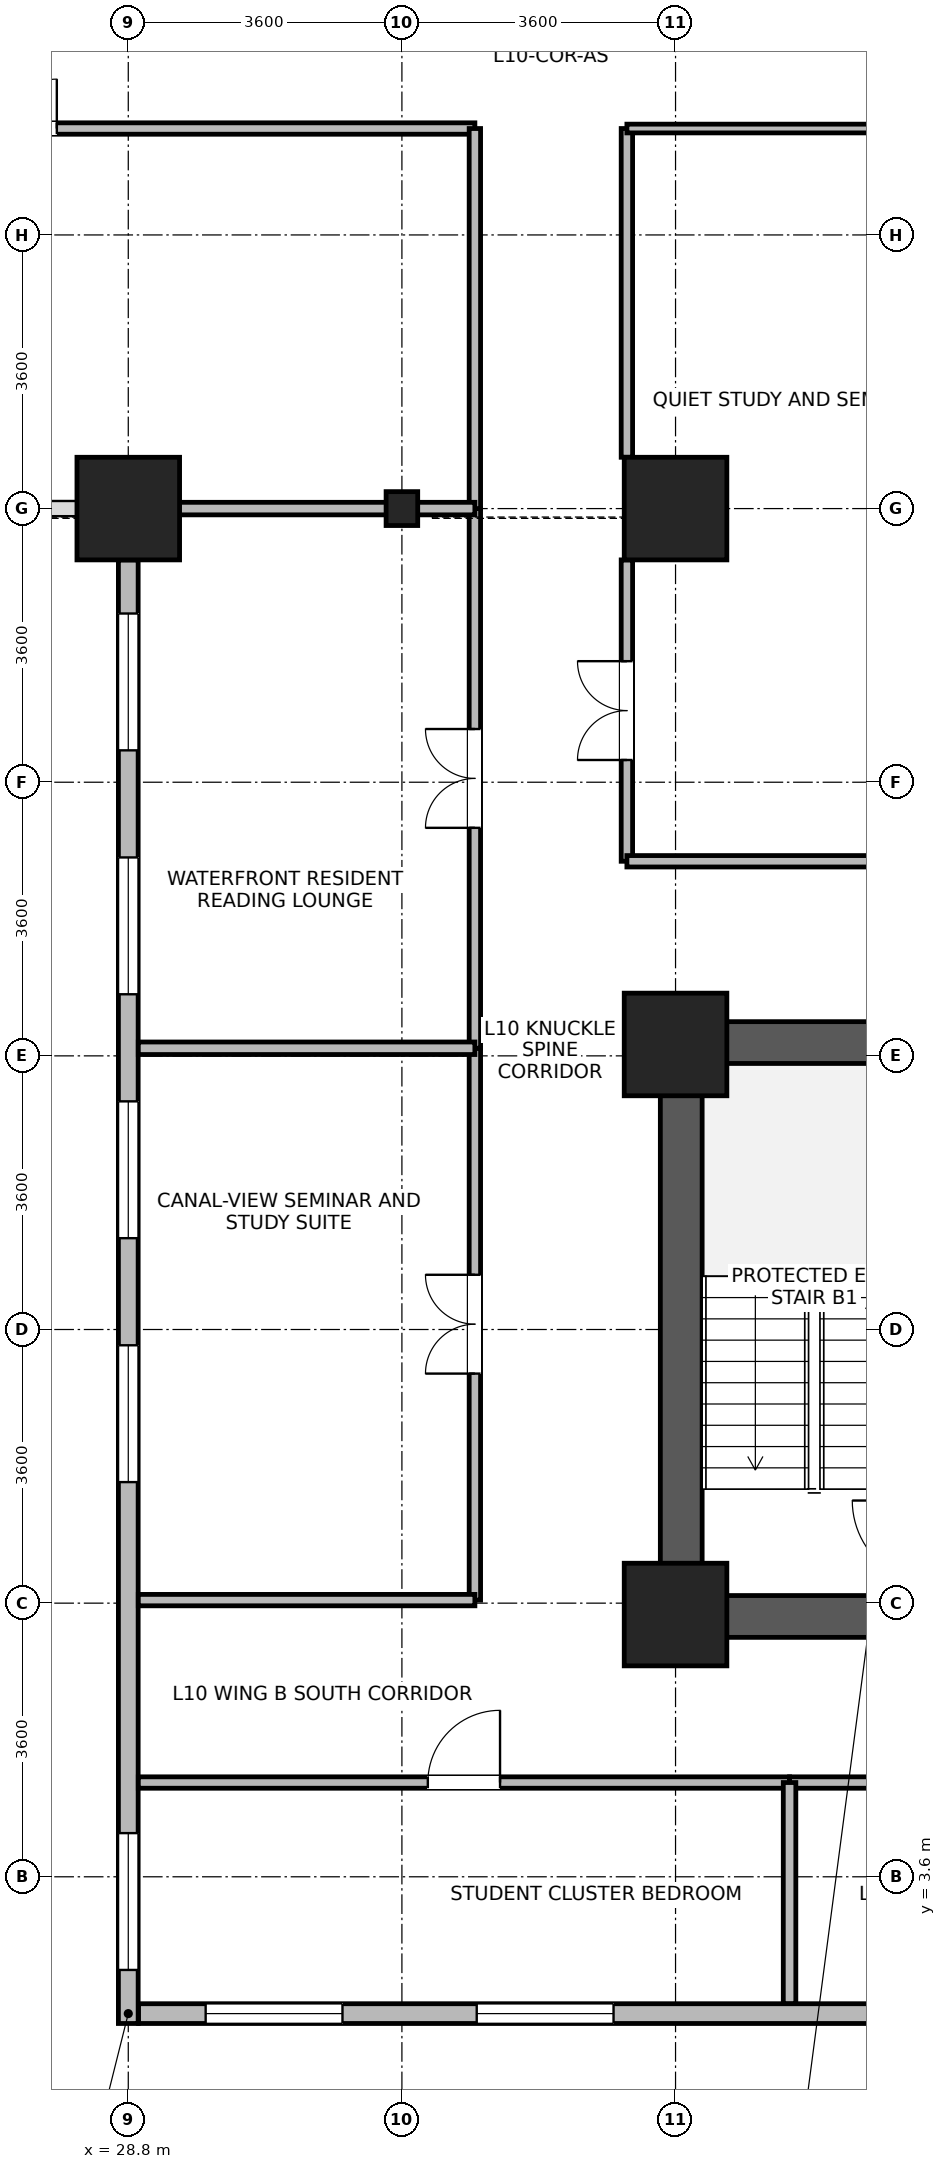
"""IFC4 building model, lengths in metres.
Left out: names, types, materials, properties, quantities, classifications, styles, units other than length and angle.
Written with IfcOpenShell. Run it as: python <this file> out.ifc"""

import sys

from ifc_helpers import new_model, si_unit, direction, frame, frame_2d, origin, origin_2d, place, context, subcontext, project, spatial, rectangle, i_section, extrude, source, transform, mapped, element, fill, save


model = new_model("IFC4")
c1 = context("Model", 3, precision=1e-05, world=origin(), true_north=direction((0.0, 1.0)))
c2 = subcontext(c1, "Body", "Model", "MODEL_VIEW")
j1 = project(units=[si_unit("LENGTHUNIT", "METRE"), si_unit("PLANEANGLEUNIT", "RADIAN")], contexts=[c1])
p1 = place(None, origin())
s1 = spatial("IfcSite", under=j1, at=p1, CompositionType="ELEMENT")
p2 = place(p1, origin())
s2 = spatial("IfcBuilding", under=s1, at=p2, CompositionType="ELEMENT")
p3 = place(p2, frame((0.0, 0.0, 43.8)))
s3 = spatial("IfcBuildingStorey", under=s2, at=p3, CompositionType="ELEMENT", Elevation=43.8)
p4 = place(p3, frame((36.075, 6.75, 0.0), z_axis=(0.0, 0.0, 1.0), x_axis=(0.0, 1.0, 0.0)))
e1 = element("IfcWall", 1, at=p4, inside=s3, PredefinedType="SHEAR", context=c2, shape_type="SweptSolid", body=[
    extrude(rectangle(XDim=8.1, YDim=0.55, at=frame_2d((4.05, 0.0))), origin(), (0.0, 0.0, 1.0), 3.45),
])
for number, where, z_axis, x_axis in (
    (2, (36.35, 7.025, 0.0), (0.0, 0.0, 1.0), (1.0, 0.0, 0.0)),
    (3, (36.35, 14.575, 0.0), (0.0, 0.0, 1.0), (1.0, 0.0, 0.0)),
):
    element("IfcWall", number, at=place(p3, frame(where, z_axis=z_axis, x_axis=x_axis)), inside=s3, PredefinedType="SHEAR", context=c2, shape_type="SweptSolid", body=[
        extrude(rectangle(XDim=3.2, YDim=0.55, at=frame_2d((1.6, 0.0))), origin(), (0.0, 0.0, 1.0), 3.45),
    ])
m1 = source(origin(), c2, "Body", "SweptSolid", [
    extrude(rectangle(XDim=1.35, YDim=1.35, at=origin_2d()), origin(), (0.0, 0.0, 1.0), 3.7),
])
for number, where, z_axis, x_axis in (
    (4, (28.8, 21.6, 0.0), (0.0, 0.0, 1.0), (1.0, 0.0, 0.0)),
    (5, (36.0, 21.6, 0.0), (0.0, 0.0, 1.0), (1.0, 0.0, 0.0)),
    (6, (36.0, 7.05, 0.0), (0.0, 0.0, 1.0), (1.0, 0.0, 0.0)),
    (7, (36.0, 14.55, 0.0), (0.0, 0.0, 1.0), (1.0, 0.0, 0.0)),
):
    element("IfcColumn", number, at=place(p3, frame(where, z_axis=z_axis, x_axis=x_axis)), inside=s3, PredefinedType="COLUMN", context=c2, shape_type="MappedRepresentation", body=[
        mapped(m1, transform((0.0, 0.0, 0.0), x_axis=(1.0, 0.0, 0.0), y_axis=(0.0, 1.0, 0.0), z_axis=(0.0, 0.0, 1.0), scale=1.0)),
    ])
m2 = source(origin(), c2, "Body", "SweptSolid", [
    extrude(i_section(OverallWidth=0.416, OverallDepth=0.446, WebThickness=0.029, FlangeThickness=0.04, FilletRadius=0.015, at=origin_2d()), origin(), (0.0, 0.0, 1.0), 3.7),
])
p5 = place(p3, frame((32.4, 21.6, 0.0), z_axis=(0.0, 0.0, 1.0), x_axis=(1.0, 0.0, 0.0)))
e8 = element("IfcColumn", 8, at=p5, inside=s3, PredefinedType="COLUMN", context=c2, shape_type="MappedRepresentation", body=[
    mapped(m2, transform((0.0, 0.0, 0.0), x_axis=(1.0, 0.0, 0.0), y_axis=(0.0, 1.0, 0.0), z_axis=(0.0, 0.0, 1.0), scale=1.0)),
])
p6 = place(p3, frame((57.465, 1.8, 0.0), z_axis=(0.0, 0.0, 1.0), x_axis=(-1.0, 0.0, 0.0)))
e9 = element("IfcWall", 9, at=p6, inside=s3, PredefinedType="STANDARD", context=c2, shape_type="SweptSolid", body=[
    extrude(rectangle(XDim=28.53, YDim=0.26, at=frame_2d((14.265, 0.0))), origin(), (0.0, 0.0, 1.0), 3.43),
])
p7 = place(p6, frame((0.883, 0.0, 0.85)))
e10 = element("IfcOpeningElement", 10, at=p7, cuts=e9, PredefinedType="OPENING", context=c2, shape_type="SweptSolid", body=[
    extrude(rectangle(XDim=1.8, YDim=1.85, at=frame_2d((0.9, 0.925))), frame((0.0, 0.14, 0.0), z_axis=(0.0, -1.0, 0.0), x_axis=(1.0, 0.0, 0.0)), (0.0, 0.0, 1.0), 0.28),
])
p8 = place(p6, frame((4.449, 0.0, 0.85)))
e11 = element("IfcOpeningElement", 11, at=p8, cuts=e9, PredefinedType="OPENING", context=c2, shape_type="SweptSolid", body=[
    extrude(rectangle(XDim=1.8, YDim=1.85, at=frame_2d((0.9, 0.925))), frame((0.0, 0.14, 0.0), z_axis=(0.0, -1.0, 0.0), x_axis=(1.0, 0.0, 0.0)), (0.0, 0.0, 1.0), 0.28),
])
p9 = place(p6, frame((8.016, 0.0, 0.85)))
e12 = element("IfcOpeningElement", 12, at=p9, cuts=e9, PredefinedType="OPENING", context=c2, shape_type="SweptSolid", body=[
    extrude(rectangle(XDim=1.8, YDim=1.85, at=frame_2d((0.9, 0.925))), frame((0.0, 0.14, 0.0), z_axis=(0.0, -1.0, 0.0), x_axis=(1.0, 0.0, 0.0)), (0.0, 0.0, 1.0), 0.28),
])
p10 = place(p6, frame((11.582, 0.0, 0.85)))
e13 = element("IfcOpeningElement", 13, at=p10, cuts=e9, PredefinedType="OPENING", context=c2, shape_type="SweptSolid", body=[
    extrude(rectangle(XDim=1.8, YDim=1.85, at=frame_2d((0.9, 0.925))), frame((0.0, 0.14, 0.0), z_axis=(0.0, -1.0, 0.0), x_axis=(1.0, 0.0, 0.0)), (0.0, 0.0, 1.0), 0.28),
])
p11 = place(p6, frame((15.148, 0.0, 0.85)))
e14 = element("IfcOpeningElement", 14, at=p11, cuts=e9, PredefinedType="OPENING", context=c2, shape_type="SweptSolid", body=[
    extrude(rectangle(XDim=1.8, YDim=1.85, at=frame_2d((0.9, 0.925))), frame((0.0, 0.14, 0.0), z_axis=(0.0, -1.0, 0.0), x_axis=(1.0, 0.0, 0.0)), (0.0, 0.0, 1.0), 0.28),
])
p12 = place(p6, frame((22.281, 0.0, 0.85)))
e15 = element("IfcOpeningElement", 15, at=p12, cuts=e9, PredefinedType="OPENING", context=c2, shape_type="SweptSolid", body=[
    extrude(rectangle(XDim=1.8, YDim=1.85, at=frame_2d((0.9, 0.925))), frame((0.0, 0.14, 0.0), z_axis=(0.0, -1.0, 0.0), x_axis=(1.0, 0.0, 0.0)), (0.0, 0.0, 1.0), 0.28),
])
p13 = place(p6, frame((25.847, 0.0, 0.85)))
e16 = element("IfcOpeningElement", 16, at=p13, cuts=e9, PredefinedType="OPENING", context=c2, shape_type="SweptSolid", body=[
    extrude(rectangle(XDim=1.8, YDim=1.85, at=frame_2d((0.9, 0.925))), frame((0.0, 0.14, 0.0), z_axis=(0.0, -1.0, 0.0), x_axis=(1.0, 0.0, 0.0)), (0.0, 0.0, 1.0), 0.28),
])
p14 = place(p3, frame((28.8, 1.67, 0.0), z_axis=(0.0, 0.0, 1.0), x_axis=(0.0, 1.0, 0.0)))
e17 = element("IfcWall", 17, at=p14, inside=s3, PredefinedType="STANDARD", context=c2, shape_type="SweptSolid", body=[
    extrude(rectangle(XDim=19.254, YDim=0.26, at=frame_2d((9.627, 0.0))), origin(), (0.0, 0.0, 1.0), 3.43),
])
p15 = place(p14, frame((0.705, 0.0, 0.85)))
e18 = element("IfcOpeningElement", 18, at=p15, cuts=e17, PredefinedType="OPENING", context=c2, shape_type="SweptSolid", body=[
    extrude(rectangle(XDim=1.8, YDim=1.85, at=frame_2d((0.9, 0.925))), frame((0.0, 0.14, 0.0), z_axis=(0.0, -1.0, 0.0), x_axis=(1.0, 0.0, 0.0)), (0.0, 0.0, 1.0), 0.28),
])
p16 = place(p14, frame((7.123, 0.0, 0.85)))
e19 = element("IfcOpeningElement", 19, at=p16, cuts=e17, PredefinedType="OPENING", context=c2, shape_type="SweptSolid", body=[
    extrude(rectangle(XDim=1.8, YDim=1.85, at=frame_2d((0.9, 0.925))), frame((0.0, 0.14, 0.0), z_axis=(0.0, -1.0, 0.0), x_axis=(1.0, 0.0, 0.0)), (0.0, 0.0, 1.0), 0.28),
])
p17 = place(p14, frame((10.332, 0.0, 0.85)))
e20 = element("IfcOpeningElement", 20, at=p17, cuts=e17, PredefinedType="OPENING", context=c2, shape_type="SweptSolid", body=[
    extrude(rectangle(XDim=1.8, YDim=1.85, at=frame_2d((0.9, 0.925))), frame((0.0, 0.14, 0.0), z_axis=(0.0, -1.0, 0.0), x_axis=(1.0, 0.0, 0.0)), (0.0, 0.0, 1.0), 0.28),
])
p18 = place(p14, frame((13.541, 0.0, 0.85)))
e21 = element("IfcOpeningElement", 21, at=p18, cuts=e17, PredefinedType="OPENING", context=c2, shape_type="SweptSolid", body=[
    extrude(rectangle(XDim=1.8, YDim=1.85, at=frame_2d((0.9, 0.925))), frame((0.0, 0.14, 0.0), z_axis=(0.0, -1.0, 0.0), x_axis=(1.0, 0.0, 0.0)), (0.0, 0.0, 1.0), 0.28),
])
p19 = place(p14, frame((16.75, 0.0, 0.85)))
e22 = element("IfcOpeningElement", 22, at=p19, cuts=e17, PredefinedType="OPENING", context=c2, shape_type="SweptSolid", body=[
    extrude(rectangle(XDim=1.8, YDim=1.85, at=frame_2d((0.9, 0.925))), frame((0.0, 0.14, 0.0), z_axis=(0.0, -1.0, 0.0), x_axis=(1.0, 0.0, 0.0)), (0.0, 0.0, 1.0), 0.28),
])
p20 = place(p3, frame((21.06, 26.6, 0.0), z_axis=(0.0, 0.0, 1.0), x_axis=(1.0, 0.0, 0.0)))
e23 = element("IfcWall", 23, at=p20, inside=s3, PredefinedType="PARTITIONING", context=c2, shape_type="SweptSolid", body=[
    extrude(rectangle(XDim=12.3, YDim=0.15, at=frame_2d((6.15, 0.0))), origin(), (0.0, 0.0, 1.0), 3.43),
])
p21 = place(p20, frame((5.5, 0.0, 0.0)))
e24 = element("IfcOpeningElement", 24, at=p21, cuts=e23, PredefinedType="OPENING", context=c2, shape_type="SweptSolid", body=[
    extrude(rectangle(XDim=1.3, YDim=2.12, at=frame_2d((0.65, 1.06))), frame((0.0, 0.085, 0.0), z_axis=(0.0, -1.0, 0.0), x_axis=(1.0, 0.0, 0.0)), (0.0, 0.0, 1.0), 0.17),
])
p22 = place(p3, frame((35.36, 16.96, 0.0), z_axis=(0.0, 0.0, 1.0), x_axis=(0.0, 1.0, 0.0)))
e25 = element("IfcWall", 25, at=p22, inside=s3, PredefinedType="PARTITIONING", context=c2, shape_type="SweptSolid", body=[
    extrude(rectangle(XDim=3.965, YDim=0.15, at=frame_2d((1.982, 0.0))), origin(), (0.0, 0.0, 1.0), 3.43),
])
p23 = place(p22, frame((1.333, 0.0, 0.0)))
e26 = element("IfcOpeningElement", 26, at=p23, cuts=e25, PredefinedType="OPENING", context=c2, shape_type="SweptSolid", body=[
    extrude(rectangle(XDim=1.3, YDim=2.12, at=frame_2d((0.65, 1.06))), frame((0.0, 0.085, 0.0), z_axis=(0.0, -1.0, 0.0), x_axis=(1.0, 0.0, 0.0)), (0.0, 0.0, 1.0), 0.17),
])
p24 = place(p3, frame((35.36, 22.275, 0.0), z_axis=(0.0, 0.0, 1.0), x_axis=(0.0, 1.0, 0.0)))
e27 = element("IfcWall", 27, at=p24, inside=s3, PredefinedType="PARTITIONING", context=c2, shape_type="SweptSolid", body=[
    extrude(rectangle(XDim=4.325, YDim=0.15, at=frame_2d((2.163, 0.0))), origin(), (0.0, 0.0, 1.0), 3.43),
])
p25 = place(p3, frame((37.5, 4.84, 0.0), z_axis=(0.0, 0.0, 1.0), x_axis=(1.0, 0.0, 0.0)))
e28 = element("IfcWall", 28, at=p25, inside=s3, PredefinedType="PARTITIONING", context=c2, shape_type="SweptSolid", body=[
    extrude(rectangle(XDim=9.2, YDim=0.15, at=frame_2d((4.6, 0.0))), origin(), (0.0, 0.0, 1.0), 3.43),
])
p26 = place(p25, frame((4.125, 0.0, 0.0)))
e29 = element("IfcOpeningElement", 29, at=p26, cuts=e28, PredefinedType="OPENING", context=c2, shape_type="SweptSolid", body=[
    extrude(rectangle(XDim=0.95, YDim=2.1, at=frame_2d((0.475, 1.05))), frame((0.0, 0.085, 0.0), z_axis=(0.0, -1.0, 0.0), x_axis=(1.0, 0.0, 0.0)), (0.0, 0.0, 1.0), 0.17),
])
p27 = place(p3, frame((28.932, 4.84, 0.0), z_axis=(0.0, 0.0, 1.0), x_axis=(1.0, 0.0, 0.0)))
e30 = element("IfcWall", 30, at=p27, inside=s3, PredefinedType="PARTITIONING", context=c2, shape_type="SweptSolid", body=[
    extrude(rectangle(XDim=8.568, YDim=0.15, at=frame_2d((4.284, 0.0))), origin(), (0.0, 0.0, 1.0), 3.43),
])
p28 = place(p27, frame((3.809, 0.0, 0.0)))
e31 = element("IfcOpeningElement", 31, at=p28, cuts=e30, PredefinedType="OPENING", context=c2, shape_type="SweptSolid", body=[
    extrude(rectangle(XDim=0.95, YDim=2.1, at=frame_2d((0.475, 1.05))), frame((0.0, 0.085, 0.0), z_axis=(0.0, -1.0, 0.0), x_axis=(1.0, 0.0, 0.0)), (0.0, 0.0, 1.0), 0.17),
])
p29 = place(p3, frame((33.36, 7.24, 0.0), z_axis=(0.0, 0.0, 1.0), x_axis=(0.0, 1.0, 0.0)))
e32 = element("IfcWall", 32, at=p29, inside=s3, PredefinedType="PARTITIONING", context=c2, shape_type="SweptSolid", body=[
    extrude(rectangle(XDim=7.26, YDim=0.15, at=frame_2d((3.63, 0.0))), origin(), (0.0, 0.0, 1.0), 3.43),
])
p30 = place(p29, frame((2.98, 0.0, 0.0)))
e33 = element("IfcOpeningElement", 33, at=p30, cuts=e32, PredefinedType="OPENING", context=c2, shape_type="SweptSolid", body=[
    extrude(rectangle(XDim=1.3, YDim=2.12, at=frame_2d((0.65, 1.06))), frame((0.0, 0.085, 0.0), z_axis=(0.0, -1.0, 0.0), x_axis=(1.0, 0.0, 0.0)), (0.0, 0.0, 1.0), 0.17),
])
p31 = place(p3, frame((33.36, 14.5, 0.0), z_axis=(0.0, 0.0, 1.0), x_axis=(0.0, 1.0, 0.0)))
e34 = element("IfcWall", 34, at=p31, inside=s3, PredefinedType="PARTITIONING", context=c2, shape_type="SweptSolid", body=[
    extrude(rectangle(XDim=7.1, YDim=0.15, at=frame_2d((3.55, 0.0))), origin(), (0.0, 0.0, 1.0), 3.43),
])
p32 = place(p31, frame((2.9, 0.0, 0.0)))
e35 = element("IfcOpeningElement", 35, at=p32, cuts=e34, PredefinedType="OPENING", context=c2, shape_type="SweptSolid", body=[
    extrude(rectangle(XDim=1.3, YDim=2.12, at=frame_2d((0.65, 1.06))), frame((0.0, 0.085, 0.0), z_axis=(0.0, -1.0, 0.0), x_axis=(1.0, 0.0, 0.0)), (0.0, 0.0, 1.0), 0.17),
])
p33 = place(p3, frame((35.36, 16.96, 0.0), z_axis=(0.0, 0.0, 1.0), x_axis=(1.0, 0.0, 0.0)))
e36 = element("IfcWall", 36, at=p33, inside=s3, PredefinedType="PARTITIONING", context=c2, shape_type="SweptSolid", body=[
    extrude(rectangle(XDim=5.14, YDim=0.15, at=frame_2d((2.57, 0.0))), origin(), (0.0, 0.0, 1.0), 3.43),
])
p34 = place(p3, frame((33.36, 21.6, 0.0), z_axis=(0.0, 0.0, 1.0), x_axis=(0.0, 1.0, 0.0)))
e37 = element("IfcWall", 37, at=p34, inside=s3, PredefinedType="PARTITIONING", context=c2, shape_type="SweptSolid", body=[
    extrude(rectangle(XDim=5.0, YDim=0.15, at=frame_2d((2.5, 0.0))), origin(), (0.0, 0.0, 1.0), 3.43),
])
p35 = place(p3, frame((28.932, 7.24, 0.0), z_axis=(0.0, 0.0, 1.0), x_axis=(1.0, 0.0, 0.0)))
e38 = element("IfcWall", 38, at=p35, inside=s3, PredefinedType="PARTITIONING", context=c2, shape_type="SweptSolid", body=[
    extrude(rectangle(XDim=4.428, YDim=0.15, at=frame_2d((2.214, 0.0))), origin(), (0.0, 0.0, 1.0), 3.43),
])
p36 = place(p3, frame((35.36, 26.6, 0.0), z_axis=(0.0, 0.0, 1.0), x_axis=(1.0, 0.0, 0.0)))
e39 = element("IfcWall", 39, at=p36, inside=s3, PredefinedType="PARTITIONING", context=c2, shape_type="SweptSolid", body=[
    extrude(rectangle(XDim=5.14, YDim=0.115, at=frame_2d((2.57, 0.0))), origin(), (0.0, 0.0, 1.0), 3.43),
])
p37 = place(p3, frame((28.932, 14.5, 0.0), z_axis=(0.0, 0.0, 1.0), x_axis=(1.0, 0.0, 0.0)))
e40 = element("IfcWall", 40, at=p37, inside=s3, PredefinedType="PARTITIONING", context=c2, shape_type="SweptSolid", body=[
    extrude(rectangle(XDim=4.428, YDim=0.165, at=frame_2d((2.214, 0.0))), origin(), (0.0, 0.0, 1.0), 3.43),
])
p38 = place(p3, frame((28.932, 21.6, 0.0), z_axis=(0.0, 0.0, 1.0), x_axis=(1.0, 0.0, 0.0)))
e41 = element("IfcWall", 41, at=p38, inside=s3, PredefinedType="PARTITIONING", context=c2, shape_type="SweptSolid", body=[
    extrude(rectangle(XDim=4.428, YDim=0.165, at=frame_2d((2.214, 0.0))), origin(), (0.0, 0.0, 1.0), 2.93),
])
p39 = place(p3, frame((37.5, 1.932, 0.0), z_axis=(0.0, 0.0, 1.0), x_axis=(0.0, 1.0, 0.0)))
e42 = element("IfcWall", 42, at=p39, inside=s3, PredefinedType="PARTITIONING", context=c2, shape_type="SweptSolid", body=[
    extrude(rectangle(XDim=2.908, YDim=0.165, at=frame_2d((1.454, 0.0))), origin(), (0.0, 0.0, 1.0), 3.43),
])
p40 = place(p12, origin())
e43 = element("IfcWindow", 43, at=p40, inside=s3, PartitioningType="SINGLE_PANEL", PredefinedType="WINDOW", context=c2, shape_type="SweptSolid", body=[
    extrude(rectangle(XDim=1.8, YDim=1.85, at=frame_2d((0.9, 0.925))), frame((0.0, 0.03, 0.0), z_axis=(0.0, -1.0, 0.0), x_axis=(1.0, 0.0, 0.0)), (0.0, 0.0, 1.0), 0.06),
])
fill(e15, e43)
p41 = place(p13, origin())
e44 = element("IfcWindow", 44, at=p41, inside=s3, PartitioningType="SINGLE_PANEL", PredefinedType="WINDOW", context=c2, shape_type="SweptSolid", body=[
    extrude(rectangle(XDim=1.8, YDim=1.85, at=frame_2d((0.9, 0.925))), frame((0.0, 0.03, 0.0), z_axis=(0.0, -1.0, 0.0), x_axis=(1.0, 0.0, 0.0)), (0.0, 0.0, 1.0), 0.06),
])
fill(e16, e44)
p42 = place(p15, origin())
e45 = element("IfcWindow", 45, at=p42, inside=s3, PartitioningType="SINGLE_PANEL", PredefinedType="WINDOW", context=c2, shape_type="SweptSolid", body=[
    extrude(rectangle(XDim=1.8, YDim=1.85, at=frame_2d((0.9, 0.925))), frame((0.0, 0.03, 0.0), z_axis=(0.0, -1.0, 0.0), x_axis=(1.0, 0.0, 0.0)), (0.0, 0.0, 1.0), 0.06),
])
fill(e18, e45)
p43 = place(p16, origin())
e46 = element("IfcWindow", 46, at=p43, inside=s3, PartitioningType="SINGLE_PANEL", PredefinedType="WINDOW", context=c2, shape_type="SweptSolid", body=[
    extrude(rectangle(XDim=1.8, YDim=1.85, at=frame_2d((0.9, 0.925))), frame((0.0, 0.03, 0.0), z_axis=(0.0, -1.0, 0.0), x_axis=(1.0, 0.0, 0.0)), (0.0, 0.0, 1.0), 0.06),
])
fill(e19, e46)
p44 = place(p17, origin())
e47 = element("IfcWindow", 47, at=p44, inside=s3, PartitioningType="SINGLE_PANEL", PredefinedType="WINDOW", context=c2, shape_type="SweptSolid", body=[
    extrude(rectangle(XDim=1.8, YDim=1.85, at=frame_2d((0.9, 0.925))), frame((0.0, 0.03, 0.0), z_axis=(0.0, -1.0, 0.0), x_axis=(1.0, 0.0, 0.0)), (0.0, 0.0, 1.0), 0.06),
])
fill(e20, e47)
p45 = place(p18, origin())
e48 = element("IfcWindow", 48, at=p45, inside=s3, PartitioningType="SINGLE_PANEL", PredefinedType="WINDOW", context=c2, shape_type="SweptSolid", body=[
    extrude(rectangle(XDim=1.8, YDim=1.85, at=frame_2d((0.9, 0.925))), frame((0.0, 0.03, 0.0), z_axis=(0.0, -1.0, 0.0), x_axis=(1.0, 0.0, 0.0)), (0.0, 0.0, 1.0), 0.06),
])
fill(e21, e48)
p46 = place(p19, origin())
e49 = element("IfcWindow", 49, at=p46, inside=s3, PartitioningType="SINGLE_PANEL", PredefinedType="WINDOW", context=c2, shape_type="SweptSolid", body=[
    extrude(rectangle(XDim=1.8, YDim=1.85, at=frame_2d((0.9, 0.925))), frame((0.0, 0.03, 0.0), z_axis=(0.0, -1.0, 0.0), x_axis=(1.0, 0.0, 0.0)), (0.0, 0.0, 1.0), 0.06),
])
fill(e22, e49)
p47 = place(p21, origin())
e50 = element("IfcDoor", 50, at=p47, inside=s3, OperationType="DOUBLE_DOOR_SINGLE_SWING", PredefinedType="DOOR", context=c2, shape_type="SweptSolid", body=[
    extrude(rectangle(XDim=1.3, YDim=2.12, at=frame_2d((0.65, 1.06))), frame((0.0, 0.025, 0.0), z_axis=(0.0, -1.0, 0.0), x_axis=(1.0, 0.0, 0.0)), (0.0, 0.0, 1.0), 0.05),
])
fill(e24, e50)
p48 = place(p23, origin())
e51 = element("IfcDoor", 51, at=p48, inside=s3, OperationType="DOUBLE_DOOR_SINGLE_SWING", PredefinedType="DOOR", context=c2, shape_type="SweptSolid", body=[
    extrude(rectangle(XDim=1.3, YDim=2.12, at=frame_2d((0.65, 1.06))), frame((0.0, 0.025, 0.0), z_axis=(0.0, -1.0, 0.0), x_axis=(1.0, 0.0, 0.0)), (0.0, 0.0, 1.0), 0.05),
])
fill(e26, e51)
p49 = place(p28, origin())
e52 = element("IfcDoor", 52, at=p49, inside=s3, OperationType="SINGLE_SWING_RIGHT", PredefinedType="DOOR", context=c2, shape_type="SweptSolid", body=[
    extrude(rectangle(XDim=0.95, YDim=2.1, at=frame_2d((0.475, 1.05))), frame((0.0, 0.025, 0.0), z_axis=(0.0, -1.0, 0.0), x_axis=(1.0, 0.0, 0.0)), (0.0, 0.0, 1.0), 0.05),
])
fill(e31, e52)
p50 = place(p30, origin())
e53 = element("IfcDoor", 53, at=p50, inside=s3, OperationType="DOUBLE_DOOR_SINGLE_SWING", PredefinedType="DOOR", context=c2, shape_type="SweptSolid", body=[
    extrude(rectangle(XDim=1.3, YDim=2.12, at=frame_2d((0.65, 1.06))), frame((0.0, 0.025, 0.0), z_axis=(0.0, -1.0, 0.0), x_axis=(1.0, 0.0, 0.0)), (0.0, 0.0, 1.0), 0.05),
])
fill(e33, e53)
p51 = place(p32, origin())
e54 = element("IfcDoor", 54, at=p51, inside=s3, OperationType="DOUBLE_DOOR_SINGLE_SWING", PredefinedType="DOOR", context=c2, shape_type="SweptSolid", body=[
    extrude(rectangle(XDim=1.3, YDim=2.12, at=frame_2d((0.65, 1.06))), frame((0.0, 0.025, 0.0), z_axis=(0.0, -1.0, 0.0), x_axis=(1.0, 0.0, 0.0)), (0.0, 0.0, 1.0), 0.05),
])
fill(e35, e54)
save(model, sys.argv[1])
